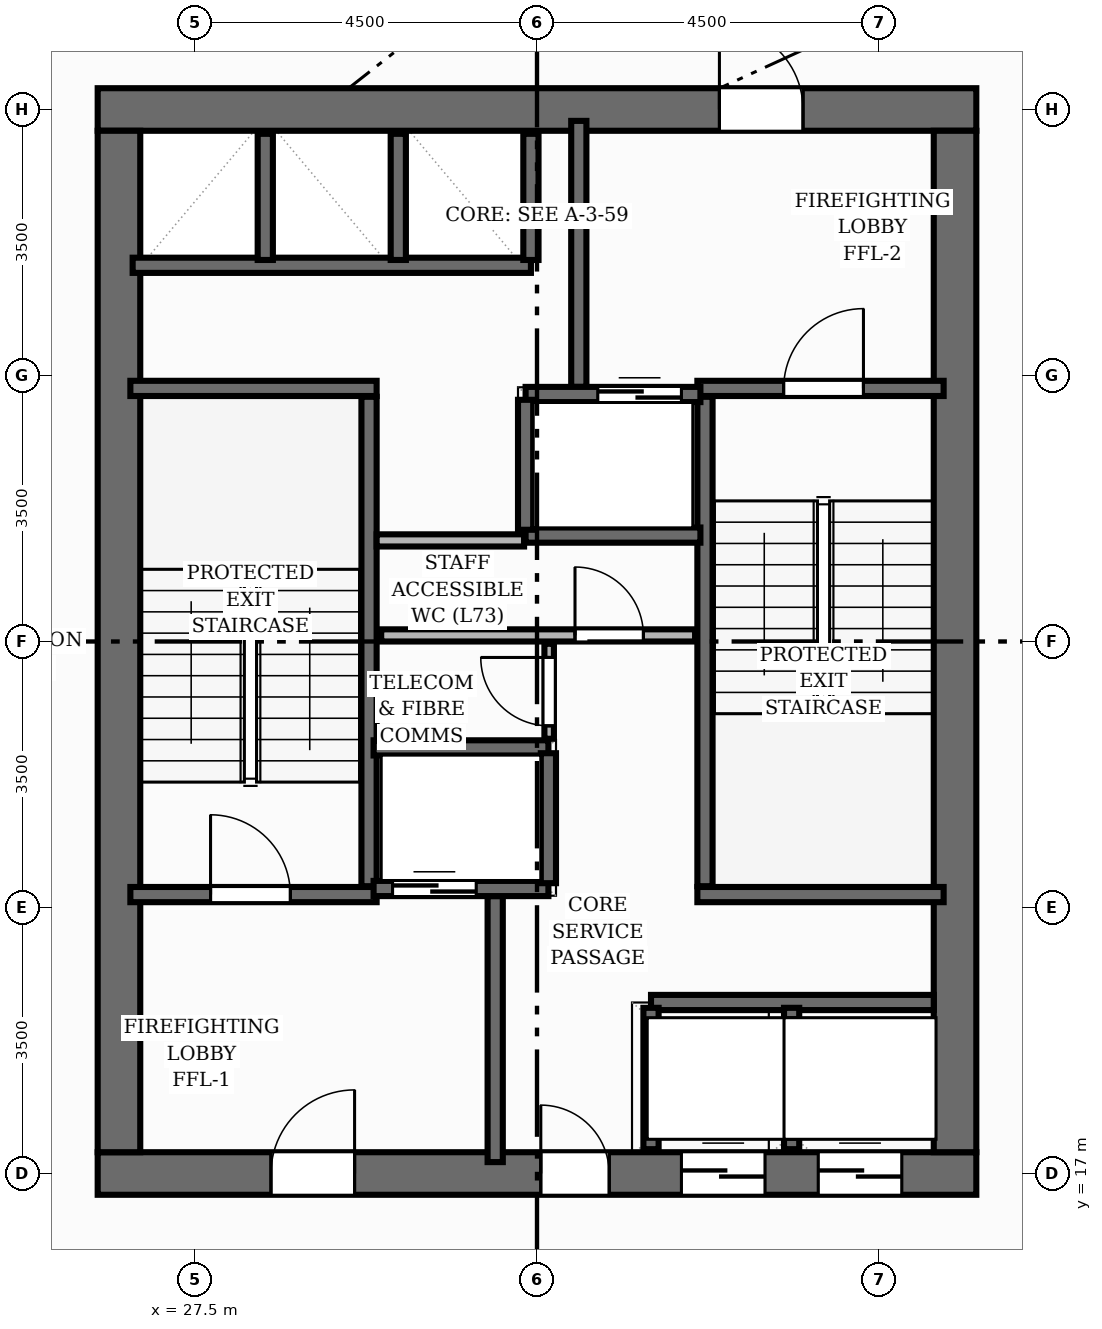
"""IFC4 building model, lengths in metres.
Left out: names, types, materials, properties, quantities, classifications, styles, units other than length and angle.
Written with IfcOpenShell. Run it as: python <this file> out.ifc"""

import sys

from ifc_helpers import new_model, si_unit, direction, frame, frame_2d, origin, place, context, subcontext, project, spatial, rectangle, extrude, element, fill, save


model = new_model("IFC4")
c1 = context("Model", 3, precision=1e-05, world=origin(), true_north=direction((0.0, 1.0)))
c2 = subcontext(c1, "Body", "Model", "MODEL_VIEW")
j1 = project(units=[si_unit("LENGTHUNIT", "METRE"), si_unit("PLANEANGLEUNIT", "RADIAN")], contexts=[c1])
p1 = place(None, origin())
s1 = spatial("IfcSite", under=j1, at=p1, CompositionType="ELEMENT")
p2 = place(p1, origin())
s2 = spatial("IfcBuilding", under=s1, at=p2, CompositionType="ELEMENT")
p3 = place(p2, frame((0.0, 0.0, 243.04)))
s3 = spatial("IfcBuildingStorey", under=s2, at=p3, CompositionType="ELEMENT", Elevation=243.04)
p4 = place(p3, frame((26.22, 17.0, 0.0), z_axis=(0.0, 0.0, 1.0), x_axis=(1.0, 0.0, 0.0)))
e1 = element("IfcWall", 1, at=p4, inside=s3, PredefinedType="SHEAR", context=c2, shape_type="SweptSolid", body=[
    extrude(rectangle(XDim=11.56, YDim=0.56, at=frame_2d((5.78, 0.0))), origin(), (0.0, 0.0, 1.0), 3.84),
])
p5 = place(p4, frame((2.28, 0.0, 0.0)))
e2 = element("IfcOpeningElement", 2, at=p5, cuts=e1, PredefinedType="OPENING", context=c2, shape_type="SweptSolid", body=[
    extrude(rectangle(XDim=1.1, YDim=2.15, at=frame_2d((0.55, 1.075))), frame((0.0, 0.29, 0.0), z_axis=(0.0, -1.0, 0.0), x_axis=(1.0, 0.0, 0.0)), (0.0, 0.0, 1.0), 0.58),
])
p6 = place(p4, frame((7.68, 0.0, 0.0)))
e3 = element("IfcOpeningElement", 3, at=p6, cuts=e1, PredefinedType="OPENING", context=c2, shape_type="SweptSolid", body=[
    extrude(rectangle(XDim=1.1, YDim=2.15, at=frame_2d((0.55, 1.075))), frame((0.0, 0.29, 0.0), z_axis=(0.0, -1.0, 0.0), x_axis=(1.0, 0.0, 0.0)), (0.0, 0.0, 1.0), 0.58),
])
p7 = place(p4, frame((9.48, 0.0, 0.0)))
e4 = element("IfcOpeningElement", 4, at=p7, cuts=e1, PredefinedType="OPENING", context=c2, shape_type="SweptSolid", body=[
    extrude(rectangle(XDim=1.1, YDim=2.15, at=frame_2d((0.55, 1.075))), frame((0.0, 0.29, 0.0), z_axis=(0.0, -1.0, 0.0), x_axis=(1.0, 0.0, 0.0)), (0.0, 0.0, 1.0), 0.58),
])
p8 = place(p4, frame((5.83, 0.0, 0.0)))
e5 = element("IfcOpeningElement", 5, at=p8, cuts=e1, PredefinedType="OPENING", context=c2, shape_type="SweptSolid", body=[
    extrude(rectangle(XDim=0.9, YDim=2.1, at=frame_2d((0.45, 1.05))), frame((0.0, 0.29, 0.0), z_axis=(0.0, -1.0, 0.0), x_axis=(1.0, 0.0, 0.0)), (0.0, 0.0, 1.0), 0.58),
])
p9 = place(p3, frame((26.22, 31.0, 0.0), z_axis=(0.0, 0.0, 1.0), x_axis=(1.0, 0.0, 0.0)))
e6 = element("IfcWall", 6, at=p9, inside=s3, PredefinedType="SHEAR", context=c2, shape_type="SweptSolid", body=[
    extrude(rectangle(XDim=11.56, YDim=0.56, at=frame_2d((5.78, 0.0))), origin(), (0.0, 0.0, 1.0), 3.84),
])
p10 = place(p9, frame((8.18, 0.0, 0.0)))
e7 = element("IfcOpeningElement", 7, at=p10, cuts=e6, PredefinedType="OPENING", context=c2, shape_type="SweptSolid", body=[
    extrude(rectangle(XDim=1.1, YDim=2.0, at=frame_2d((0.55, 1.0))), frame((0.0, 0.29, 0.0), z_axis=(0.0, -1.0, 0.0), x_axis=(1.0, 0.0, 0.0)), (0.0, 0.0, 1.0), 0.58),
])
for number, where, z_axis, x_axis in (
    (8, (26.5, 17.28, 0.0), (0.0, 0.0, 1.0), (0.0, 1.0, 0.0)),
    (9, (37.5, 17.28, 0.0), (0.0, 0.0, 1.0), (0.0, 1.0, 0.0)),
):
    element("IfcWall", number, at=place(p3, frame(where, z_axis=z_axis, x_axis=x_axis)), inside=s3, PredefinedType="SHEAR", context=c2, shape_type="SweptSolid", body=[
        extrude(rectangle(XDim=13.44, YDim=0.56, at=frame_2d((6.72, 0.0))), origin(), (0.0, 0.0, 1.0), 3.84),
    ])
p11 = place(p3, frame((29.79, 20.78, 0.0), z_axis=(0.0, 0.0, 1.0), x_axis=(0.0, 1.0, 0.0)))
e10 = element("IfcWall", 10, at=p11, inside=s3, PredefinedType="SHEAR", context=c2, shape_type="SweptSolid", body=[
    extrude(rectangle(XDim=6.44, YDim=0.2, at=frame_2d((3.22, 0.0))), origin(), (0.0, 0.0, 1.0), 3.84),
])
p12 = place(p3, frame((26.65, 27.33, 0.0), z_axis=(0.0, 0.0, 1.0), x_axis=(1.0, 0.0, 0.0)))
e11 = element("IfcWall", 11, at=p12, inside=s3, PredefinedType="SHEAR", context=c2, shape_type="SweptSolid", body=[
    extrude(rectangle(XDim=3.24, YDim=0.2, at=frame_2d((1.62, 0.0))), origin(), (0.0, 0.0, 1.0), 3.84),
])
p13 = place(p3, frame((26.65, 20.67, 0.0), z_axis=(0.0, 0.0, 1.0), x_axis=(1.0, 0.0, 0.0)))
e12 = element("IfcWall", 12, at=p13, inside=s3, PredefinedType="SHEAR", context=c2, shape_type="SweptSolid", body=[
    extrude(rectangle(XDim=3.24, YDim=0.2, at=frame_2d((1.62, 0.0))), origin(), (0.0, 0.0, 1.0), 3.84),
])
p14 = place(p13, frame((1.055, 0.0, 0.0)))
e13 = element("IfcOpeningElement", 13, at=p14, cuts=e12, PredefinedType="OPENING", context=c2, shape_type="SweptSolid", body=[
    extrude(rectangle(XDim=1.05, YDim=2.15, at=frame_2d((0.525, 1.075))), frame((0.0, 0.11, 0.0), z_axis=(0.0, -1.0, 0.0), x_axis=(1.0, 0.0, 0.0)), (0.0, 0.0, 1.0), 0.22),
])
p15 = place(p3, frame((34.21, 20.78, 0.0), z_axis=(0.0, 0.0, 1.0), x_axis=(0.0, 1.0, 0.0)))
e14 = element("IfcWall", 14, at=p15, inside=s3, PredefinedType="SHEAR", context=c2, shape_type="SweptSolid", body=[
    extrude(rectangle(XDim=6.44, YDim=0.2, at=frame_2d((3.22, 0.0))), origin(), (0.0, 0.0, 1.0), 3.84),
])
p16 = place(p3, frame((34.11, 20.67, 0.0), z_axis=(0.0, 0.0, 1.0), x_axis=(1.0, 0.0, 0.0)))
e15 = element("IfcWall", 15, at=p16, inside=s3, PredefinedType="SHEAR", context=c2, shape_type="SweptSolid", body=[
    extrude(rectangle(XDim=3.24, YDim=0.2, at=frame_2d((1.62, 0.0))), origin(), (0.0, 0.0, 1.0), 3.84),
])
p17 = place(p3, frame((34.11, 27.33, 0.0), z_axis=(0.0, 0.0, 1.0), x_axis=(1.0, 0.0, 0.0)))
e16 = element("IfcWall", 16, at=p17, inside=s3, PredefinedType="SHEAR", context=c2, shape_type="SweptSolid", body=[
    extrude(rectangle(XDim=3.24, YDim=0.2, at=frame_2d((1.62, 0.0))), origin(), (0.0, 0.0, 1.0), 3.84),
])
p18 = place(p17, frame((1.135, 0.0, 0.0)))
e17 = element("IfcOpeningElement", 17, at=p18, cuts=e16, PredefinedType="OPENING", context=c2, shape_type="SweptSolid", body=[
    extrude(rectangle(XDim=1.05, YDim=2.15, at=frame_2d((0.525, 1.075))), frame((0.0, 0.11, 0.0), z_axis=(0.0, -1.0, 0.0), x_axis=(1.0, 0.0, 0.0)), (0.0, 0.0, 1.0), 0.22),
])
for number, where, z_axis, x_axis in (
    (18, (31.45, 17.15, 0.0), (0.0, 0.0, 1.0), (0.0, 1.0, 0.0)),
    (19, (32.55, 27.35, 0.0), (0.0, 0.0, 1.0), (0.0, 1.0, 0.0)),
):
    element("IfcWall", number, at=place(p3, frame(where, z_axis=z_axis, x_axis=x_axis)), inside=s3, PredefinedType="SHEAR", context=c2, shape_type="SweptSolid", body=[
        extrude(rectangle(XDim=3.5, YDim=0.2, at=frame_2d((1.75, 0.0))), origin(), (0.0, 0.0, 1.0), 3.84),
    ])
p19 = place(p3, frame((29.85, 20.75, 0.0), z_axis=(0.0, 0.0, 1.0), x_axis=(1.0, 0.0, 0.0)))
e20 = element("IfcWall", 20, at=p19, inside=s3, PredefinedType="SHEAR", context=c2, shape_type="SweptSolid", body=[
    extrude(rectangle(XDim=2.3, YDim=0.2, at=frame_2d((1.15, 0.0))), origin(), (0.0, 0.0, 1.0), 3.84),
])
p20 = place(p19, frame((0.25, 0.0, 0.0)))
e21 = element("IfcOpeningElement", 21, at=p20, cuts=e20, PredefinedType="OPENING", context=c2, shape_type="SweptSolid", body=[
    extrude(rectangle(XDim=1.1, YDim=2.15, at=frame_2d((0.55, 1.075))), frame((0.0, 0.11, 0.0), z_axis=(0.0, -1.0, 0.0), x_axis=(1.0, 0.0, 0.0)), (0.0, 0.0, 1.0), 0.22),
])
p21 = place(p3, frame((29.85, 22.6, 0.0), z_axis=(0.0, 0.0, 1.0), x_axis=(1.0, 0.0, 0.0)))
e22 = element("IfcWall", 22, at=p21, inside=s3, PredefinedType="SHEAR", context=c2, shape_type="SweptSolid", body=[
    extrude(rectangle(XDim=2.3, YDim=0.2, at=frame_2d((1.15, 0.0))), origin(), (0.0, 0.0, 1.0), 3.84),
])
p22 = place(p3, frame((32.15, 20.82, 0.0), z_axis=(0.0, 0.0, 1.0), x_axis=(0.0, 1.0, 0.0)))
e23 = element("IfcWall", 23, at=p22, inside=s3, PredefinedType="SHEAR", context=c2, shape_type="SweptSolid", body=[
    extrude(rectangle(XDim=1.71, YDim=0.2, at=frame_2d((0.855, 0.0))), origin(), (0.0, 0.0, 1.0), 3.84),
])
p23 = place(p3, frame((31.85, 27.25, 0.0), z_axis=(0.0, 0.0, 1.0), x_axis=(1.0, 0.0, 0.0)))
e24 = element("IfcWall", 24, at=p23, inside=s3, PredefinedType="SHEAR", context=c2, shape_type="SweptSolid", body=[
    extrude(rectangle(XDim=2.3, YDim=0.2, at=frame_2d((1.15, 0.0))), origin(), (0.0, 0.0, 1.0), 3.84),
])
p24 = place(p23, frame((0.95, 0.0, 0.0)))
e25 = element("IfcOpeningElement", 25, at=p24, cuts=e24, PredefinedType="OPENING", context=c2, shape_type="SweptSolid", body=[
    extrude(rectangle(XDim=1.1, YDim=2.15, at=frame_2d((0.55, 1.075))), frame((0.0, 0.11, 0.0), z_axis=(0.0, -1.0, 0.0), x_axis=(1.0, 0.0, 0.0)), (0.0, 0.0, 1.0), 0.22),
])
p25 = place(p3, frame((31.85, 25.4, 0.0), z_axis=(0.0, 0.0, 1.0), x_axis=(1.0, 0.0, 0.0)))
e26 = element("IfcWall", 26, at=p25, inside=s3, PredefinedType="SHEAR", context=c2, shape_type="SweptSolid", body=[
    extrude(rectangle(XDim=2.3, YDim=0.2, at=frame_2d((1.15, 0.0))), origin(), (0.0, 0.0, 1.0), 3.84),
])
p26 = place(p3, frame((31.85, 25.47, 0.0), z_axis=(0.0, 0.0, 1.0), x_axis=(0.0, 1.0, 0.0)))
e27 = element("IfcWall", 27, at=p26, inside=s3, PredefinedType="SHEAR", context=c2, shape_type="SweptSolid", body=[
    extrude(rectangle(XDim=1.71, YDim=0.2, at=frame_2d((0.855, 0.0))), origin(), (0.0, 0.0, 1.0), 3.84),
])
p27 = place(p3, frame((26.68, 28.95, 0.0), z_axis=(0.0, 0.0, 1.0), x_axis=(1.0, 0.0, 0.0)))
e28 = element("IfcWall", 28, at=p27, inside=s3, PredefinedType="SHEAR", context=c2, shape_type="SweptSolid", body=[
    extrude(rectangle(XDim=5.24, YDim=0.2, at=frame_2d((2.62, 0.0))), origin(), (0.0, 0.0, 1.0), 3.84),
])
for number, where, z_axis, x_axis in (
    (29, (31.92, 29.02, 0.0), (0.0, 0.0, 1.0), (0.0, 1.0, 0.0)),
    (30, (28.425, 29.02, 0.0), (0.0, 0.0, 1.0), (0.0, 1.0, 0.0)),
    (31, (30.175, 29.02, 0.0), (0.0, 0.0, 1.0), (0.0, 1.0, 0.0)),
):
    element("IfcWall", number, at=place(p3, frame(where, z_axis=z_axis, x_axis=x_axis)), inside=s3, PredefinedType="SHEAR", context=c2, shape_type="SweptSolid", body=[
        extrude(rectangle(XDim=1.66, YDim=0.2, at=frame_2d((0.83, 0.0))), origin(), (0.0, 0.0, 1.0), 3.84),
    ])
p28 = place(p3, frame((33.5, 19.25, 0.0), z_axis=(0.0, 0.0, 1.0), x_axis=(1.0, 0.0, 0.0)))
e32 = element("IfcWall", 32, at=p28, inside=s3, PredefinedType="SHEAR", context=c2, shape_type="SweptSolid", body=[
    extrude(rectangle(XDim=3.72, YDim=0.2, at=frame_2d((1.86, 0.0))), origin(), (0.0, 0.0, 1.0), 3.84),
])
for number, where, z_axis, x_axis in (
    (33, (33.5, 17.32, 0.0), (0.0, 0.0, 1.0), (0.0, 1.0, 0.0)),
    (34, (35.35, 17.32, 0.0), (0.0, 0.0, 1.0), (0.0, 1.0, 0.0)),
):
    element("IfcWall", number, at=place(p3, frame(where, z_axis=z_axis, x_axis=x_axis)), inside=s3, PredefinedType="SHEAR", context=c2, shape_type="SweptSolid", body=[
        extrude(rectangle(XDim=1.86, YDim=0.2, at=frame_2d((0.93, 0.0))), origin(), (0.0, 0.0, 1.0), 3.84),
    ])
p29 = place(p3, frame((29.95, 24.08, 0.0), z_axis=(0.0, 0.0, 1.0), x_axis=(1.0, 0.0, 0.0)))
e35 = element("IfcWall", 35, at=p29, inside=s3, PredefinedType="PLUMBINGWALL", context=c2, shape_type="SweptSolid", body=[
    extrude(rectangle(XDim=4.13, YDim=0.16, at=frame_2d((2.065, 0.0))), origin(), (0.0, 0.0, 1.0), 3.515),
])
p30 = place(p29, frame((2.55, 0.0, 0.0)))
e36 = element("IfcOpeningElement", 36, at=p30, cuts=e35, PredefinedType="OPENING", context=c2, shape_type="SweptSolid", body=[
    extrude(rectangle(XDim=0.9, YDim=2.1, at=frame_2d((0.45, 1.05))), frame((0.0, 0.09, 0.0), z_axis=(0.0, -1.0, 0.0), x_axis=(1.0, 0.0, 0.0)), (0.0, 0.0, 1.0), 0.18),
])
p31 = place(p3, frame((32.16, 22.72, 0.0), z_axis=(0.0, 0.0, 1.0), x_axis=(0.0, 1.0, 0.0)))
e37 = element("IfcWall", 37, at=p31, inside=s3, PredefinedType="PARTITIONING", context=c2, shape_type="SweptSolid", body=[
    extrude(rectangle(XDim=1.25, YDim=0.125, at=frame_2d((0.625, 0.0))), origin(), (0.0, 0.0, 1.0), 3.515),
])
p32 = place(p31, frame((0.17, 0.0, 0.0)))
e38 = element("IfcOpeningElement", 38, at=p32, cuts=e37, PredefinedType="OPENING", context=c2, shape_type="SweptSolid", body=[
    extrude(rectangle(XDim=0.9, YDim=2.1, at=frame_2d((0.45, 1.05))), frame((0.0, 0.073, 0.0), z_axis=(0.0, -1.0, 0.0), x_axis=(1.0, 0.0, 0.0)), (0.0, 0.0, 1.0), 0.145),
])
p33 = place(p3, frame((29.89, 25.33, 0.0), z_axis=(0.0, 0.0, 1.0), x_axis=(1.0, 0.0, 0.0)))
e39 = element("IfcWall", 39, at=p33, inside=s3, PredefinedType="PLUMBINGWALL", context=c2, shape_type="SweptSolid", body=[
    extrude(rectangle(XDim=1.94, YDim=0.16, at=frame_2d((0.97, 0.0))), origin(), (0.0, 0.0, 1.0), 3.515),
])
p34 = place(p14, origin())
e40 = element("IfcDoor", 40, at=p34, inside=s3, OperationType="SINGLE_SWING_LEFT", PredefinedType="DOOR", context=c2, shape_type="SweptSolid", body=[
    extrude(rectangle(XDim=1.05, YDim=2.15, at=frame_2d((0.525, 1.075))), frame((0.0, 0.025, 0.0), z_axis=(0.0, -1.0, 0.0), x_axis=(1.0, 0.0, 0.0)), (0.0, 0.0, 1.0), 0.05),
])
fill(e13, e40)
p35 = place(p18, origin())
e41 = element("IfcDoor", 41, at=p35, inside=s3, OperationType="SINGLE_SWING_RIGHT", PredefinedType="DOOR", context=c2, shape_type="SweptSolid", body=[
    extrude(rectangle(XDim=1.05, YDim=2.15, at=frame_2d((0.525, 1.075))), frame((0.0, 0.025, 0.0), z_axis=(0.0, -1.0, 0.0), x_axis=(1.0, 0.0, 0.0)), (0.0, 0.0, 1.0), 0.05),
])
fill(e17, e41)
p36 = place(p5, origin())
e42 = element("IfcDoor", 42, at=p36, inside=s3, OperationType="SINGLE_SWING_RIGHT", PredefinedType="DOOR", context=c2, shape_type="SweptSolid", body=[
    extrude(rectangle(XDim=1.1, YDim=2.15, at=frame_2d((0.55, 1.075))), frame((0.0, 0.025, 0.0), z_axis=(0.0, -1.0, 0.0), x_axis=(1.0, 0.0, 0.0)), (0.0, 0.0, 1.0), 0.05),
])
fill(e2, e42)
p37 = place(p10, origin())
e43 = element("IfcDoor", 43, at=p37, inside=s3, OperationType="SINGLE_SWING_LEFT", PredefinedType="DOOR", context=c2, shape_type="SweptSolid", body=[
    extrude(rectangle(XDim=1.1, YDim=2.0, at=frame_2d((0.55, 1.0))), frame((0.0, 0.025, 0.0), z_axis=(0.0, -1.0, 0.0), x_axis=(1.0, 0.0, 0.0)), (0.0, 0.0, 1.0), 0.05),
])
fill(e7, e43)
p38 = place(p20, origin())
e44 = element("IfcDoor", 44, at=p38, inside=s3, OperationType="DOUBLE_DOOR_SLIDING", PredefinedType="DOOR", context=c2, shape_type="SweptSolid", body=[
    extrude(rectangle(XDim=1.1, YDim=2.15, at=frame_2d((0.55, 1.075))), frame((0.0, 0.025, 0.0), z_axis=(0.0, -1.0, 0.0), x_axis=(1.0, 0.0, 0.0)), (0.0, 0.0, 1.0), 0.05),
])
fill(e21, e44)
p39 = place(p24, origin())
e45 = element("IfcDoor", 45, at=p39, inside=s3, OperationType="DOUBLE_DOOR_SLIDING", PredefinedType="DOOR", context=c2, shape_type="SweptSolid", body=[
    extrude(rectangle(XDim=1.1, YDim=2.15, at=frame_2d((0.55, 1.075))), frame((0.0, 0.025, 0.0), z_axis=(0.0, -1.0, 0.0), x_axis=(1.0, 0.0, 0.0)), (0.0, 0.0, 1.0), 0.05),
])
fill(e25, e45)
p40 = place(p6, origin())
e46 = element("IfcDoor", 46, at=p40, inside=s3, OperationType="DOUBLE_DOOR_SLIDING", PredefinedType="DOOR", context=c2, shape_type="SweptSolid", body=[
    extrude(rectangle(XDim=1.1, YDim=2.15, at=frame_2d((0.55, 1.075))), frame((0.0, 0.025, 0.0), z_axis=(0.0, -1.0, 0.0), x_axis=(1.0, 0.0, 0.0)), (0.0, 0.0, 1.0), 0.05),
])
fill(e3, e46)
p41 = place(p7, origin())
e47 = element("IfcDoor", 47, at=p41, inside=s3, OperationType="DOUBLE_DOOR_SLIDING", PredefinedType="DOOR", context=c2, shape_type="SweptSolid", body=[
    extrude(rectangle(XDim=1.1, YDim=2.15, at=frame_2d((0.55, 1.075))), frame((0.0, 0.025, 0.0), z_axis=(0.0, -1.0, 0.0), x_axis=(1.0, 0.0, 0.0)), (0.0, 0.0, 1.0), 0.05),
])
fill(e4, e47)
p42 = place(p8, origin())
e48 = element("IfcDoor", 48, at=p42, inside=s3, OperationType="SINGLE_SWING_LEFT", PredefinedType="DOOR", context=c2, shape_type="SweptSolid", body=[
    extrude(rectangle(XDim=0.9, YDim=2.1, at=frame_2d((0.45, 1.05))), frame((0.0, 0.025, 0.0), z_axis=(0.0, -1.0, 0.0), x_axis=(1.0, 0.0, 0.0)), (0.0, 0.0, 1.0), 0.05),
])
fill(e5, e48)
p43 = place(p30, origin())
e49 = element("IfcDoor", 49, at=p43, inside=s3, OperationType="SINGLE_SWING_LEFT", PredefinedType="DOOR", context=c2, shape_type="SweptSolid", body=[
    extrude(rectangle(XDim=0.9, YDim=2.1, at=frame_2d((0.45, 1.05))), frame((0.0, 0.025, 0.0), z_axis=(0.0, -1.0, 0.0), x_axis=(1.0, 0.0, 0.0)), (0.0, 0.0, 1.0), 0.05),
])
fill(e36, e49)
p44 = place(p32, origin())
e50 = element("IfcDoor", 50, at=p44, inside=s3, OperationType="SINGLE_SWING_RIGHT", PredefinedType="DOOR", context=c2, shape_type="SweptSolid", body=[
    extrude(rectangle(XDim=0.9, YDim=2.1, at=frame_2d((0.45, 1.05))), frame((0.0, 0.025, 0.0), z_axis=(0.0, -1.0, 0.0), x_axis=(1.0, 0.0, 0.0)), (0.0, 0.0, 1.0), 0.05),
])
fill(e38, e50)
save(model, sys.argv[1])
